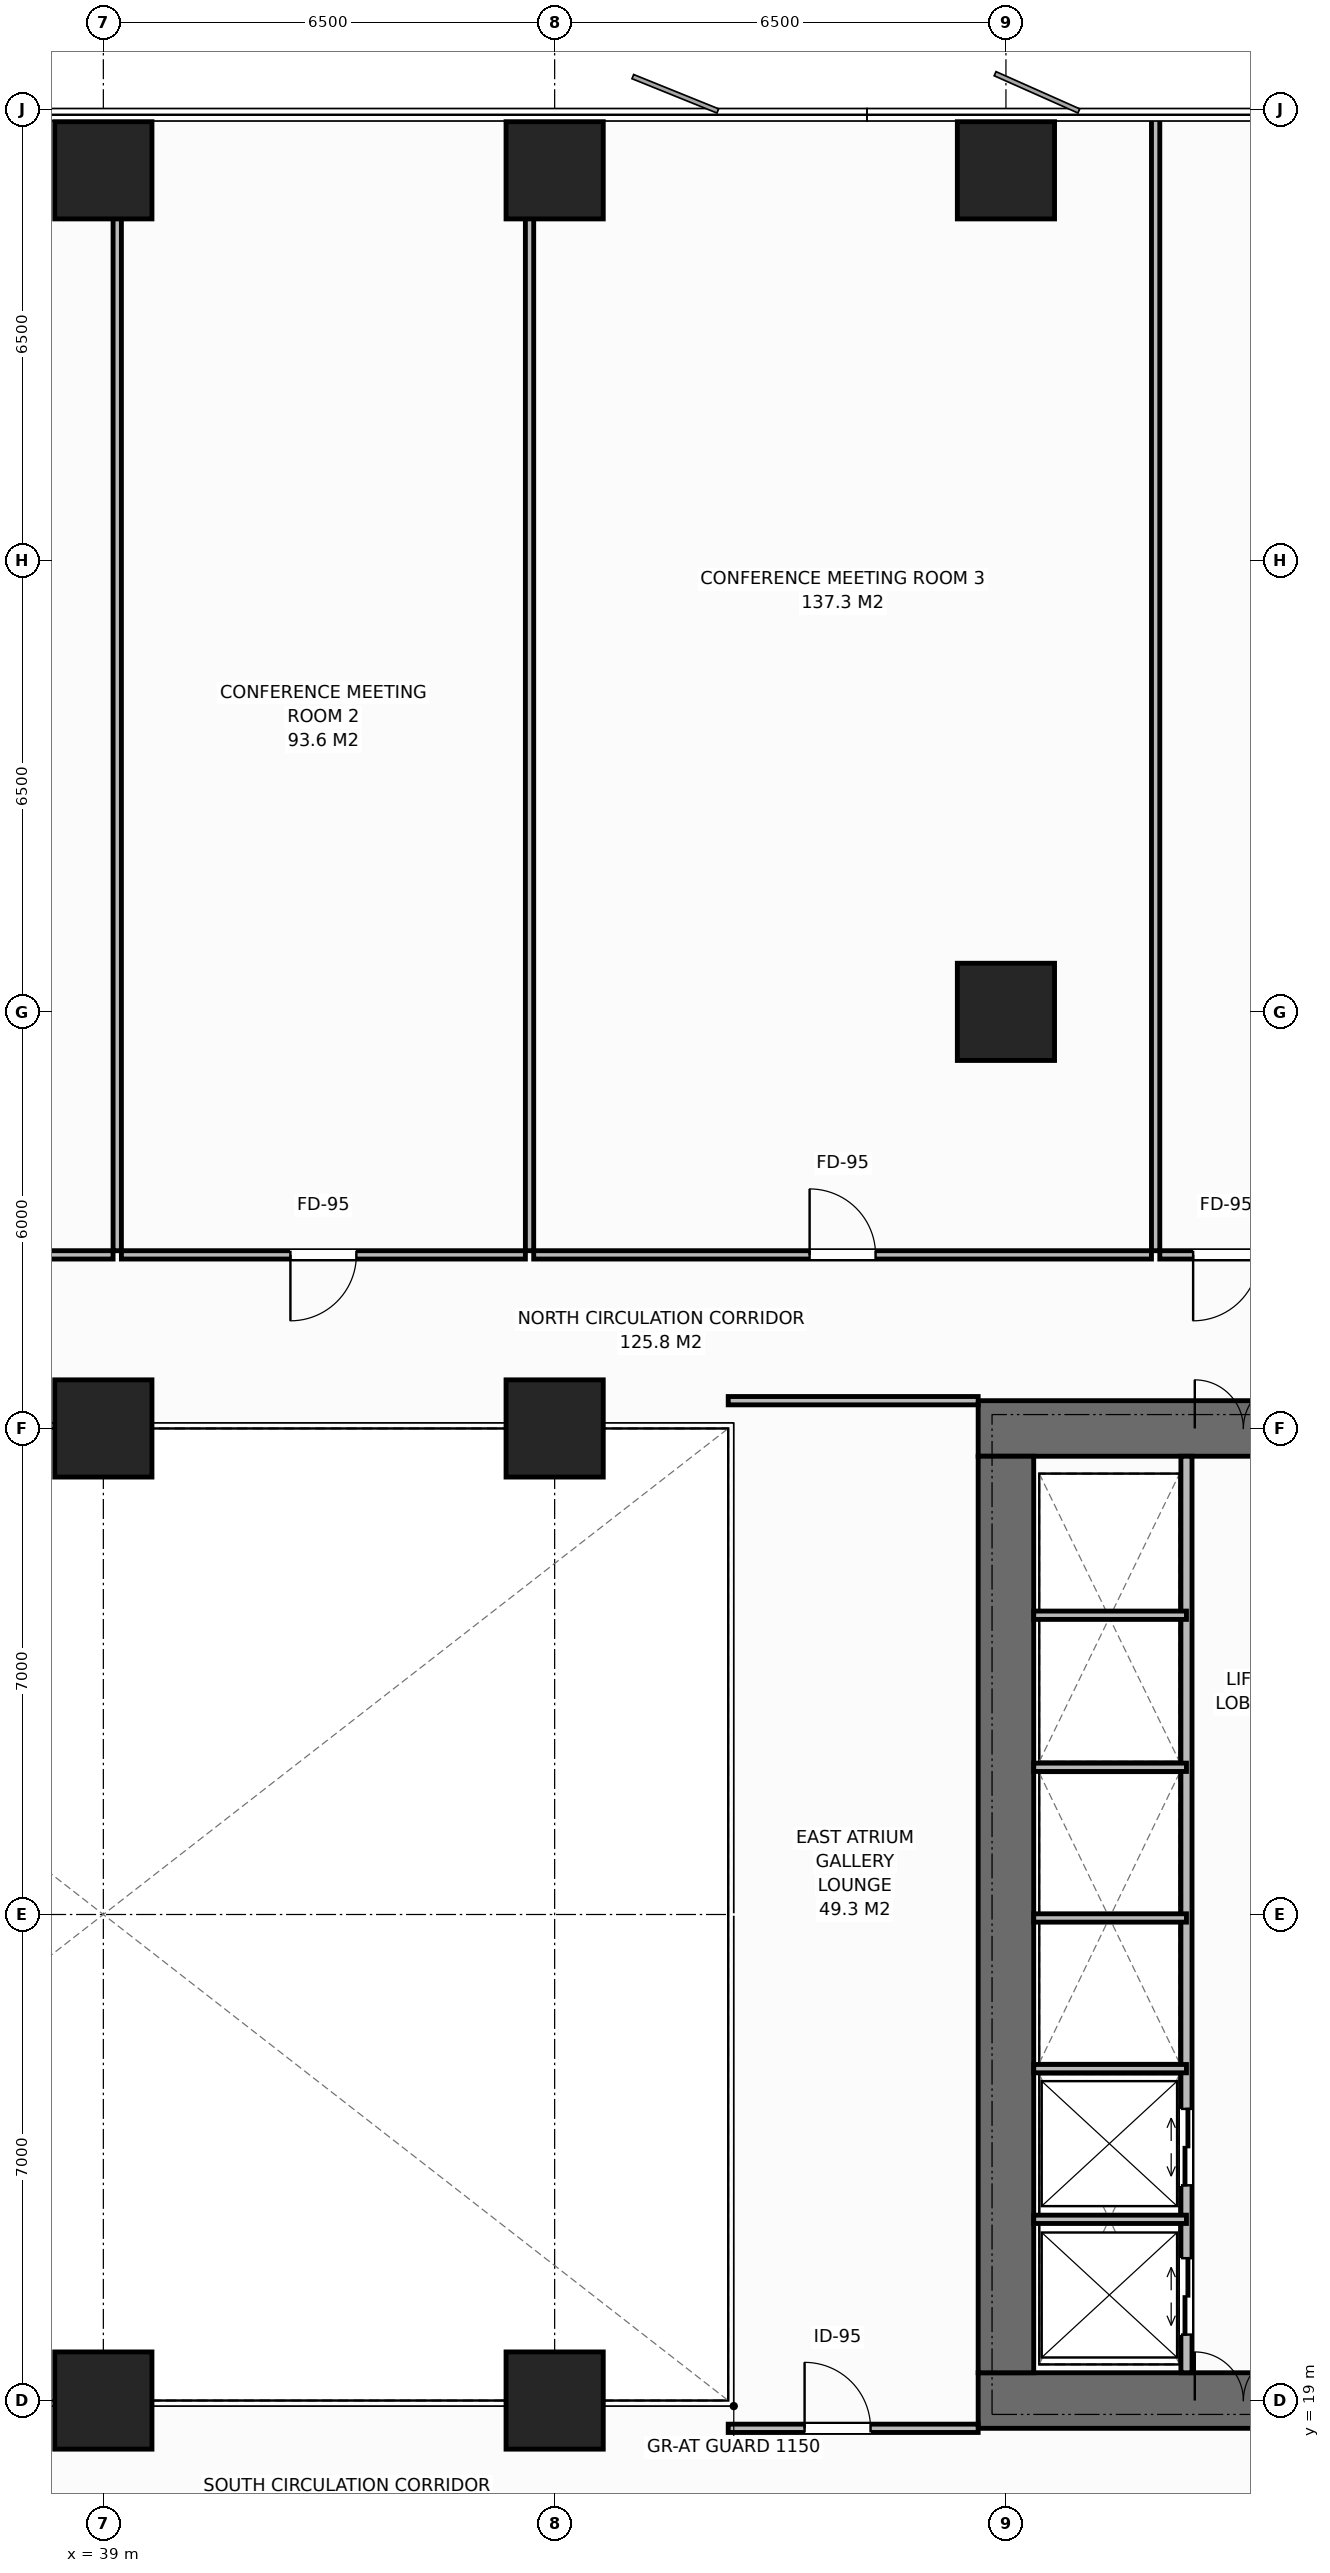
"""IFC4 building model, lengths in metres.
Left out: names, types, materials, properties, quantities, classifications, styles, units other than length and angle.
Written with IfcOpenShell. Run it as: python <this file> out.ifc"""

import sys

from ifc_helpers import new_model, si_unit, direction, frame, frame_2d, origin, origin_2d, place, context, subcontext, project, spatial, rectangle, extrude, element, fill, save


model = new_model("IFC4")
c1 = context("Model", 3, precision=1e-05, world=origin(), true_north=direction((0.0, 1.0)))
c2 = subcontext(c1, "Body", "Model", "MODEL_VIEW")
j1 = project(units=[si_unit("LENGTHUNIT", "METRE"), si_unit("PLANEANGLEUNIT", "RADIAN")], contexts=[c1])
p1 = place(None, origin())
s1 = spatial("IfcSite", under=j1, at=p1, CompositionType="ELEMENT")
p2 = place(p1, origin())
s2 = spatial("IfcBuilding", under=s1, at=p2, CompositionType="ELEMENT")
p3 = place(p2, frame((0.0, 0.0, 77.2)))
s3 = spatial("IfcBuildingStorey", under=s2, at=p3, CompositionType="ELEMENT", Elevation=77.2)
p4 = place(p3, frame((51.6, 19.0, 0.0), z_axis=(0.0, 0.0, 1.0), x_axis=(1.0, 0.0, 0.0)))
e1 = element("IfcWall", 1, at=p4, inside=s3, PredefinedType="SHEAR", context=c2, shape_type="SweptSolid", body=[
    extrude(rectangle(XDim=13.8, YDim=0.8, at=frame_2d((6.9, 0.0))), origin(), (0.0, 0.0, 1.0), 3.8),
])
p5 = place(p4, frame((3.12, 0.0, 0.0)))
e2 = element("IfcOpeningElement", 2, at=p5, cuts=e1, PredefinedType="OPENING", context=c2, shape_type="SweptSolid", body=[
    extrude(rectangle(XDim=1.4, YDim=2.2, at=frame_2d((0.7, 1.1))), frame((0.0, 0.41, 0.0), z_axis=(0.0, -1.0, 0.0), x_axis=(1.0, 0.0, 0.0)), (0.0, 0.0, 1.0), 0.82),
])
p6 = place(p3, frame((51.6, 33.0, 0.0), z_axis=(0.0, 0.0, 1.0), x_axis=(1.0, 0.0, 0.0)))
e3 = element("IfcWall", 3, at=p6, inside=s3, PredefinedType="SHEAR", context=c2, shape_type="SweptSolid", body=[
    extrude(rectangle(XDim=13.8, YDim=0.8, at=frame_2d((6.9, 0.0))), origin(), (0.0, 0.0, 1.0), 3.8),
])
p7 = place(p6, frame((3.12, 0.0, 0.0)))
e4 = element("IfcOpeningElement", 4, at=p7, cuts=e3, PredefinedType="OPENING", context=c2, shape_type="SweptSolid", body=[
    extrude(rectangle(XDim=1.4, YDim=2.2, at=frame_2d((0.7, 1.1))), frame((0.0, 0.41, 0.0), z_axis=(0.0, -1.0, 0.0), x_axis=(1.0, 0.0, 0.0)), (0.0, 0.0, 1.0), 0.82),
])
p8 = place(p6, frame((11.0, 0.0, 0.0)))
e5 = element("IfcOpeningElement", 5, at=p8, cuts=e3, PredefinedType="OPENING", context=c2, shape_type="SweptSolid", body=[
    extrude(rectangle(XDim=0.9, YDim=2.15, at=frame_2d((0.45, 1.075))), frame((0.0, 0.41, 0.0), z_axis=(0.0, -1.0, 0.0), x_axis=(1.0, 0.0, 0.0)), (0.0, 0.0, 1.0), 0.82),
])
p9 = place(p6, frame((5.75, 0.0, 0.0)))
e6 = element("IfcOpeningElement", 6, at=p9, cuts=e3, PredefinedType="OPENING", context=c2, shape_type="SweptSolid", body=[
    extrude(rectangle(XDim=0.9, YDim=2.15, at=frame_2d((0.45, 1.075))), frame((0.0, 0.41, 0.0), z_axis=(0.0, -1.0, 0.0), x_axis=(1.0, 0.0, 0.0)), (0.0, 0.0, 1.0), 0.82),
])
p10 = place(p6, frame((7.35, 0.0, 0.0)))
e7 = element("IfcOpeningElement", 7, at=p10, cuts=e3, PredefinedType="OPENING", context=c2, shape_type="SweptSolid", body=[
    extrude(rectangle(XDim=0.9, YDim=2.15, at=frame_2d((0.45, 1.075))), frame((0.0, 0.41, 0.0), z_axis=(0.0, -1.0, 0.0), x_axis=(1.0, 0.0, 0.0)), (0.0, 0.0, 1.0), 0.82),
])
p11 = place(p6, frame((8.95, 0.0, 0.0)))
e8 = element("IfcOpeningElement", 8, at=p11, cuts=e3, PredefinedType="OPENING", context=c2, shape_type="SweptSolid", body=[
    extrude(rectangle(XDim=0.9, YDim=2.15, at=frame_2d((0.45, 1.075))), frame((0.0, 0.41, 0.0), z_axis=(0.0, -1.0, 0.0), x_axis=(1.0, 0.0, 0.0)), (0.0, 0.0, 1.0), 0.82),
])
p12 = place(p3, frame((52.0, 19.4, 0.0), z_axis=(0.0, 0.0, 1.0), x_axis=(0.0, 1.0, 0.0)))
e9 = element("IfcWall", 9, at=p12, inside=s3, PredefinedType="SHEAR", context=c2, shape_type="SweptSolid", body=[
    extrude(rectangle(XDim=13.2, YDim=0.8, at=frame_2d((6.6, 0.0))), origin(), (0.0, 0.0, 1.0), 3.8),
])
for number, where, z_axis, x_axis in (
    (10, (39.0, 19.0, 0.0), (0.0, 0.0, 1.0), (1.0, 0.0, 0.0)),
    (11, (39.0, 33.0, 0.0), (0.0, 0.0, 1.0), (1.0, 0.0, 0.0)),
    (12, (45.5, 19.0, 0.0), (0.0, 0.0, 1.0), (1.0, 0.0, 0.0)),
    (13, (45.5, 33.0, 0.0), (0.0, 0.0, 1.0), (1.0, 0.0, 0.0)),
    (14, (52.0, 39.0, 0.0), (0.0, 0.0, 1.0), (1.0, 0.0, 0.0)),
    (15, (39.0, 51.12, 0.0), (0.0, 0.0, 1.0), (1.0, 0.0, 0.0)),
    (16, (45.5, 51.12, 0.0), (0.0, 0.0, 1.0), (1.0, 0.0, 0.0)),
    (17, (52.0, 51.12, 0.0), (0.0, 0.0, 1.0), (1.0, 0.0, 0.0)),
):
    element("IfcColumn", number, at=place(p3, frame(where, z_axis=z_axis, x_axis=x_axis)), inside=s3, PredefinedType="COLUMN", context=c2, shape_type="SweptSolid", body=[
        extrude(rectangle(XDim=1.4, YDim=1.4, at=origin_2d()), origin(), (0.0, 0.0, 1.0), 3.8),
    ])
p13 = place(p3, frame((54.6, 19.4, 0.0), z_axis=(0.0, 0.0, 1.0), x_axis=(0.0, 1.0, 0.0)))
e18 = element("IfcWall", 18, at=p13, inside=s3, PredefinedType="STANDARD", context=c2, shape_type="SweptSolid", body=[
    extrude(rectangle(XDim=13.2, YDim=0.16, at=frame_2d((6.6, 0.0))), origin(), (0.0, 0.0, 1.0), 3.52),
])
p14 = place(p13, frame((0.55, 0.0, 0.0)))
e19 = element("IfcOpeningElement", 19, at=p14, cuts=e18, PredefinedType="OPENING", context=c2, shape_type="SweptSolid", body=[
    extrude(rectangle(XDim=1.1, YDim=2.2, at=frame_2d((0.55, 1.1))), frame((0.0, 0.09, 0.0), z_axis=(0.0, -1.0, 0.0), x_axis=(1.0, 0.0, 0.0)), (0.0, 0.0, 1.0), 0.18),
])
p15 = place(p13, frame((2.7, 0.0, 0.0)))
e20 = element("IfcOpeningElement", 20, at=p15, cuts=e18, PredefinedType="OPENING", context=c2, shape_type="SweptSolid", body=[
    extrude(rectangle(XDim=1.1, YDim=2.2, at=frame_2d((0.55, 1.1))), frame((0.0, 0.09, 0.0), z_axis=(0.0, -1.0, 0.0), x_axis=(1.0, 0.0, 0.0)), (0.0, 0.0, 1.0), 0.18),
])
for number, where, z_axis, x_axis in (
    (21, (52.4, 21.61, 0.0), (0.0, 0.0, 1.0), (1.0, 0.0, 0.0)),
    (22, (52.4, 23.78, 0.0), (0.0, 0.0, 1.0), (1.0, 0.0, 0.0)),
    (23, (52.4, 25.95, 0.0), (0.0, 0.0, 1.0), (1.0, 0.0, 0.0)),
    (24, (52.4, 28.12, 0.0), (0.0, 0.0, 1.0), (1.0, 0.0, 0.0)),
    (25, (52.4, 30.31, 0.0), (0.0, 0.0, 1.0), (1.0, 0.0, 0.0)),
):
    element("IfcWall", number, at=place(p3, frame(where, z_axis=z_axis, x_axis=x_axis)), inside=s3, PredefinedType="PARTITIONING", context=c2, shape_type="SweptSolid", body=[
        extrude(rectangle(XDim=2.2, YDim=0.12, at=frame_2d((1.1, 0.0))), origin(), (0.0, 0.0, 1.0), 3.52),
    ])
p16 = place(p3, frame((48.0, 33.4, 0.0), z_axis=(0.0, 0.0, 1.0), x_axis=(1.0, 0.0, 0.0)))
e26 = element("IfcWall", 26, at=p16, inside=s3, PredefinedType="PARTITIONING", context=c2, shape_type="SweptSolid", body=[
    extrude(rectangle(XDim=3.6, YDim=0.12, at=frame_2d((1.8, 0.0))), origin(), (0.0, 0.0, 1.0), 3.52),
])
p17 = place(p3, frame((48.0, 18.6, 0.0), z_axis=(0.0, 0.0, 1.0), x_axis=(1.0, 0.0, 0.0)))
e27 = element("IfcWall", 27, at=p17, inside=s3, PredefinedType="PARTITIONING", context=c2, shape_type="SweptSolid", body=[
    extrude(rectangle(XDim=3.6, YDim=0.12, at=frame_2d((1.8, 0.0))), origin(), (0.0, 0.0, 1.0), 3.52),
])
p18 = place(p17, frame((1.1, 0.0, 0.0)))
e28 = element("IfcOpeningElement", 28, at=p18, cuts=e27, PredefinedType="OPENING", context=c2, shape_type="SweptSolid", body=[
    extrude(rectangle(XDim=0.95, YDim=2.15, at=frame_2d((0.475, 1.075))), frame((0.0, 0.07, 0.0), z_axis=(0.0, -1.0, 0.0), x_axis=(1.0, 0.0, 0.0)), (0.0, 0.0, 1.0), 0.14),
])
p19 = place(p3, frame((39.2, 35.56, 0.0), z_axis=(0.0, 0.0, 1.0), x_axis=(0.0, 1.0, 0.0)))
e29 = element("IfcWall", 29, at=p19, inside=s3, PredefinedType="PARTITIONING", context=c2, shape_type="SweptSolid", body=[
    extrude(rectangle(XDim=16.42, YDim=0.12, at=frame_2d((8.21, 0.0))), origin(), (0.0, 0.0, 1.0), 2.72),
])
p20 = place(p3, frame((26.42, 35.5, 0.0), z_axis=(0.0, 0.0, 1.0), x_axis=(1.0, 0.0, 0.0)))
e30 = element("IfcWall", 30, at=p20, inside=s3, PredefinedType="PARTITIONING", context=c2, shape_type="SweptSolid", body=[
    extrude(rectangle(XDim=12.72, YDim=0.12, at=frame_2d((6.36, 0.0))), origin(), (0.0, 0.0, 1.0), 3.52),
])
p21 = place(p20, frame((7.954, 0.0, 0.0)))
e31 = element("IfcOpeningElement", 31, at=p21, cuts=e30, PredefinedType="OPENING", context=c2, shape_type="SweptSolid", body=[
    extrude(rectangle(XDim=0.95, YDim=2.15, at=frame_2d((0.475, 1.075))), frame((0.0, 0.07, 0.0), z_axis=(0.0, -1.0, 0.0), x_axis=(1.0, 0.0, 0.0)), (0.0, 0.0, 1.0), 0.14),
])
p22 = place(p3, frame((45.138, 35.56, 0.0), z_axis=(0.0, 0.0, 1.0), x_axis=(0.0, 1.0, 0.0)))
e32 = element("IfcWall", 32, at=p22, inside=s3, PredefinedType="PARTITIONING", context=c2, shape_type="SweptSolid", body=[
    extrude(rectangle(XDim=16.42, YDim=0.12, at=frame_2d((8.21, 0.0))), origin(), (0.0, 0.0, 1.0), 3.52),
])
p23 = place(p3, frame((39.26, 35.5, 0.0), z_axis=(0.0, 0.0, 1.0), x_axis=(1.0, 0.0, 0.0)))
e33 = element("IfcWall", 33, at=p23, inside=s3, PredefinedType="PARTITIONING", context=c2, shape_type="SweptSolid", body=[
    extrude(rectangle(XDim=5.819, YDim=0.12, at=frame_2d((2.909, 0.0))), origin(), (0.0, 0.0, 1.0), 3.52),
])
p24 = place(p23, frame((2.434, 0.0, 0.0)))
e34 = element("IfcOpeningElement", 34, at=p24, cuts=e33, PredefinedType="OPENING", context=c2, shape_type="SweptSolid", body=[
    extrude(rectangle(XDim=0.95, YDim=2.15, at=frame_2d((0.475, 1.075))), frame((0.0, 0.07, 0.0), z_axis=(0.0, -1.0, 0.0), x_axis=(1.0, 0.0, 0.0)), (0.0, 0.0, 1.0), 0.14),
])
p25 = place(p3, frame((54.156, 35.56, 0.0), z_axis=(0.0, 0.0, 1.0), x_axis=(0.0, 1.0, 0.0)))
e35 = element("IfcWall", 35, at=p25, inside=s3, PredefinedType="PARTITIONING", context=c2, shape_type="SweptSolid", body=[
    extrude(rectangle(XDim=16.42, YDim=0.12, at=frame_2d((8.21, 0.0))), origin(), (0.0, 0.0, 1.0), 3.52),
])
p26 = place(p3, frame((45.198, 35.5, 0.0), z_axis=(0.0, 0.0, 1.0), x_axis=(1.0, 0.0, 0.0)))
e36 = element("IfcWall", 36, at=p26, inside=s3, PredefinedType="PARTITIONING", context=c2, shape_type="SweptSolid", body=[
    extrude(rectangle(XDim=8.898, YDim=0.12, at=frame_2d((4.449, 0.0))), origin(), (0.0, 0.0, 1.0), 3.52),
])
p27 = place(p26, frame((3.974, 0.0, 0.0)))
e37 = element("IfcOpeningElement", 37, at=p27, cuts=e36, PredefinedType="OPENING", context=c2, shape_type="SweptSolid", body=[
    extrude(rectangle(XDim=0.95, YDim=2.15, at=frame_2d((0.475, 1.075))), frame((0.0, 0.07, 0.0), z_axis=(0.0, -1.0, 0.0), x_axis=(1.0, 0.0, 0.0)), (0.0, 0.0, 1.0), 0.14),
])
p28 = place(p3, frame((54.216, 35.5, 0.0), z_axis=(0.0, 0.0, 1.0), x_axis=(1.0, 0.0, 0.0)))
e38 = element("IfcWall", 38, at=p28, inside=s3, PredefinedType="PARTITIONING", context=c2, shape_type="SweptSolid", body=[
    extrude(rectangle(XDim=5.819, YDim=0.12, at=frame_2d((2.909, 0.0))), origin(), (0.0, 0.0, 1.0), 3.52),
])
p29 = place(p28, frame((0.48, 0.0, 0.0)))
e39 = element("IfcOpeningElement", 39, at=p29, cuts=e38, PredefinedType="OPENING", context=c2, shape_type="SweptSolid", body=[
    extrude(rectangle(XDim=0.95, YDim=2.15, at=frame_2d((0.475, 1.075))), frame((0.0, 0.07, 0.0), z_axis=(0.0, -1.0, 0.0), x_axis=(1.0, 0.0, 0.0)), (0.0, 0.0, 1.0), 0.14),
])
p30 = place(p5, origin())
e40 = element("IfcDoor", 40, at=p30, inside=s3, OperationType="DOUBLE_DOOR_SINGLE_SWING", PredefinedType="DOOR", context=c2, shape_type="SweptSolid", body=[
    extrude(rectangle(XDim=1.4, YDim=2.2, at=frame_2d((0.7, 1.1))), frame((0.0, 0.125, 0.0), z_axis=(0.0, -1.0, 0.0), x_axis=(1.0, 0.0, 0.0)), (0.0, 0.0, 1.0), 0.05),
])
fill(e2, e40)
p31 = place(p7, origin())
e41 = element("IfcDoor", 41, at=p31, inside=s3, OperationType="DOUBLE_DOOR_SINGLE_SWING", PredefinedType="DOOR", context=c2, shape_type="SweptSolid", body=[
    extrude(rectangle(XDim=1.4, YDim=2.2, at=frame_2d((0.7, 1.1))), frame((0.0, -0.075, 0.0), z_axis=(0.0, -1.0, 0.0), x_axis=(1.0, 0.0, 0.0)), (0.0, 0.0, 1.0), 0.05),
])
fill(e4, e41)
p32 = place(p14, origin())
e42 = element("IfcDoor", 42, at=p32, inside=s3, OperationType="DOUBLE_DOOR_SLIDING", PredefinedType="DOOR", context=c2, shape_type="SweptSolid", body=[
    extrude(rectangle(XDim=1.1, YDim=2.2, at=frame_2d((0.55, 1.1))), frame((0.0, 0.025, 0.0), z_axis=(0.0, -1.0, 0.0), x_axis=(1.0, 0.0, 0.0)), (0.0, 0.0, 1.0), 0.05),
])
fill(e19, e42)
p33 = place(p15, origin())
e43 = element("IfcDoor", 43, at=p33, inside=s3, OperationType="DOUBLE_DOOR_SLIDING", PredefinedType="DOOR", context=c2, shape_type="SweptSolid", body=[
    extrude(rectangle(XDim=1.1, YDim=2.2, at=frame_2d((0.55, 1.1))), frame((0.0, 0.025, 0.0), z_axis=(0.0, -1.0, 0.0), x_axis=(1.0, 0.0, 0.0)), (0.0, 0.0, 1.0), 0.05),
])
fill(e20, e43)
p34 = place(p18, origin())
e44 = element("IfcDoor", 44, at=p34, inside=s3, OperationType="SINGLE_SWING_LEFT", PredefinedType="DOOR", context=c2, shape_type="SweptSolid", body=[
    extrude(rectangle(XDim=0.95, YDim=2.15, at=frame_2d((0.475, 1.075))), frame((0.0, 0.025, 0.0), z_axis=(0.0, -1.0, 0.0), x_axis=(1.0, 0.0, 0.0)), (0.0, 0.0, 1.0), 0.05),
])
fill(e28, e44)
p35 = place(p24, origin())
e45 = element("IfcDoor", 45, at=p35, inside=s3, OperationType="SINGLE_SWING_RIGHT", PredefinedType="DOOR", context=c2, shape_type="SweptSolid", body=[
    extrude(rectangle(XDim=0.95, YDim=2.15, at=frame_2d((0.475, 1.075))), frame((0.0, 0.025, 0.0), z_axis=(0.0, -1.0, 0.0), x_axis=(1.0, 0.0, 0.0)), (0.0, 0.0, 1.0), 0.05),
])
fill(e34, e45)
p36 = place(p27, origin())
e46 = element("IfcDoor", 46, at=p36, inside=s3, OperationType="SINGLE_SWING_LEFT", PredefinedType="DOOR", context=c2, shape_type="SweptSolid", body=[
    extrude(rectangle(XDim=0.95, YDim=2.15, at=frame_2d((0.475, 1.075))), frame((0.0, 0.025, 0.0), z_axis=(0.0, -1.0, 0.0), x_axis=(1.0, 0.0, 0.0)), (0.0, 0.0, 1.0), 0.05),
])
fill(e37, e46)
p37 = place(p29, origin())
e47 = element("IfcDoor", 47, at=p37, inside=s3, OperationType="SINGLE_SWING_RIGHT", PredefinedType="DOOR", context=c2, shape_type="SweptSolid", body=[
    extrude(rectangle(XDim=0.95, YDim=2.15, at=frame_2d((0.475, 1.075))), frame((0.0, 0.025, 0.0), z_axis=(0.0, -1.0, 0.0), x_axis=(1.0, 0.0, 0.0)), (0.0, 0.0, 1.0), 0.05),
])
fill(e39, e47)
save(model, sys.argv[1])
